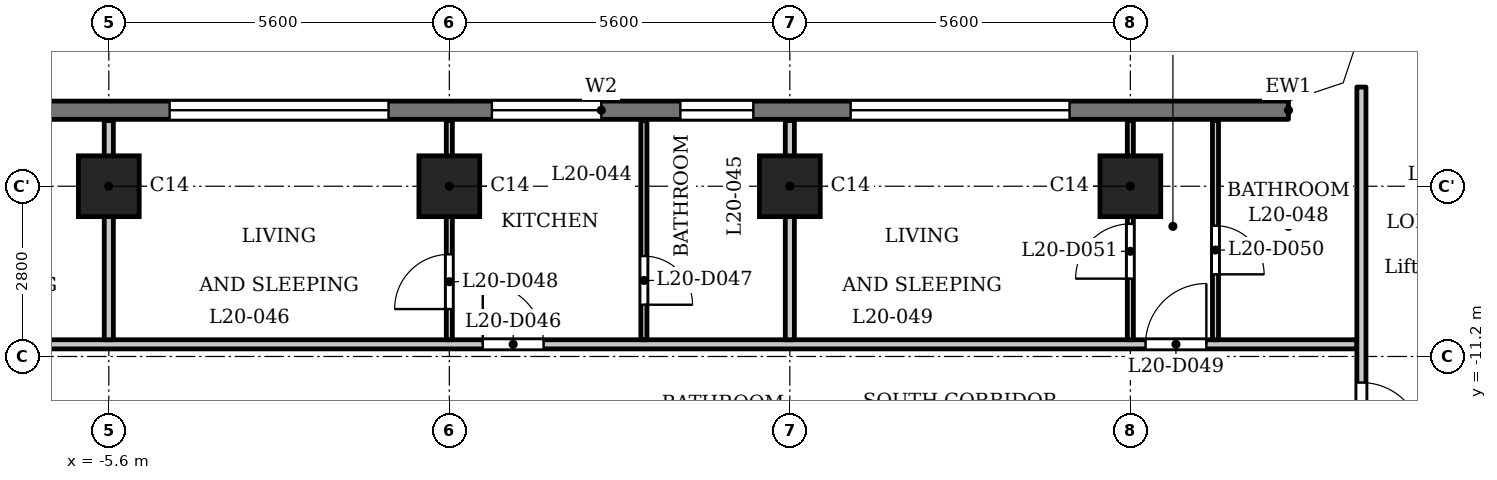
"""IFC4 building model, lengths in metres.
Left out: names, types, materials, properties, quantities, classifications, styles, units other than length and angle.
Written with IfcOpenShell. Run it as: python <this file> out.ifc"""

import sys

from ifc_helpers import new_model, si_unit, direction, frame, frame_2d, origin, origin_2d, place, context, subcontext, project, spatial, polyline, rectangle, outline, extrude, element, fill, save


model = new_model("IFC4")
c1 = context("Model", 3, precision=1e-05, world=origin(), true_north=direction((0.0, 1.0)))
c2 = subcontext(c1, "Body", "Model", "MODEL_VIEW")
j1 = project(units=[si_unit("LENGTHUNIT", "METRE"), si_unit("PLANEANGLEUNIT", "RADIAN")], contexts=[c1])
p1 = place(None, origin())
s1 = spatial("IfcSite", under=j1, at=p1, CompositionType="ELEMENT")
p2 = place(p1, origin())
s2 = spatial("IfcBuilding", under=s1, at=p2, CompositionType="ELEMENT")
p3 = place(p2, frame((0.0, 0.0, 83.3)))
s3 = spatial("IfcBuildingStorey", under=s2, at=p3, CompositionType="ELEMENT", Elevation=83.3)
for number, where, z_axis, x_axis in (
    (1, (-5.6, -8.4, 0.0), (0.0, 0.0, 1.0), (1.0, 0.0, 0.0)),
    (2, (0.0, -8.4, 0.0), (0.0, 0.0, 1.0), (1.0, 0.0, 0.0)),
    (3, (5.6, -8.4, 0.0), (0.0, 0.0, 1.0), (1.0, 0.0, 0.0)),
    (4, (11.2, -8.4, 0.0), (0.0, 0.0, 1.0), (1.0, 0.0, 0.0)),
):
    element("IfcColumn", number, at=place(p3, frame(where, z_axis=z_axis, x_axis=x_axis)), inside=s3, PredefinedType="COLUMN", context=c2, shape_type="SweptSolid", body=[
        extrude(rectangle(XDim=1.0, YDim=1.0, at=origin_2d()), origin(), (0.0, 0.0, 1.0), 3.5),
    ])
p4 = place(p3, frame((13.8, -7.15, 0.0), z_axis=(0.0, 0.0, 1.0), x_axis=(-1.0, 0.0, 0.0)))
e5 = element("IfcWall", 5, at=p4, inside=s3, PredefinedType="SOLIDWALL", context=c2, shape_type="SweptSolid", body=[
    extrude(rectangle(XDim=27.6, YDim=0.3, at=frame_2d((13.8, 0.0))), origin(), (0.0, 0.0, 1.0), 3.2),
])
p5 = place(p4, frame((3.6, 0.0, 1.2)))
e6 = element("IfcOpeningElement", 6, at=p5, cuts=e5, PredefinedType="OPENING", context=c2, shape_type="SweptSolid", body=[
    extrude(rectangle(XDim=3.6, YDim=0.95, at=frame_2d((1.8, 0.475))), frame((0.0, 0.16, 0.0), z_axis=(0.0, -1.0, 0.0), x_axis=(1.0, 0.0, 0.0)), (0.0, 0.0, 1.0), 0.32),
])
p6 = place(p4, frame((8.8, 0.0, 0.6)))
e7 = element("IfcOpeningElement", 7, at=p6, cuts=e5, PredefinedType="OPENING", context=c2, shape_type="SweptSolid", body=[
    extrude(rectangle(XDim=1.2, YDim=1.55, at=frame_2d((0.6, 0.775))), frame((0.0, 0.16, 0.0), z_axis=(0.0, -1.0, 0.0), x_axis=(1.0, 0.0, 0.0)), (0.0, 0.0, 1.0), 0.32),
])
p7 = place(p4, frame((11.3, 0.0, 0.9)))
e8 = element("IfcOpeningElement", 8, at=p7, cuts=e5, PredefinedType="OPENING", context=c2, shape_type="SweptSolid", body=[
    extrude(rectangle(XDim=1.8, YDim=1.25, at=frame_2d((0.9, 0.625))), frame((0.0, 0.16, 0.0), z_axis=(0.0, -1.0, 0.0), x_axis=(1.0, 0.0, 0.0)), (0.0, 0.0, 1.0), 0.32),
])
p8 = place(p4, frame((14.8, 0.0, 1.2)))
e9 = element("IfcOpeningElement", 9, at=p8, cuts=e5, PredefinedType="OPENING", context=c2, shape_type="SweptSolid", body=[
    extrude(rectangle(XDim=3.6, YDim=0.95, at=frame_2d((1.8, 0.475))), frame((0.0, 0.16, 0.0), z_axis=(0.0, -1.0, 0.0), x_axis=(1.0, 0.0, 0.0)), (0.0, 0.0, 1.0), 0.32),
])
p9 = place(p4, frame((20.4, 0.0, 1.2)))
e10 = element("IfcOpeningElement", 10, at=p9, cuts=e5, PredefinedType="OPENING", context=c2, shape_type="SweptSolid", body=[
    extrude(rectangle(XDim=3.6, YDim=0.95, at=frame_2d((1.8, 0.475))), frame((0.0, 0.16, 0.0), z_axis=(0.0, -1.0, 0.0), x_axis=(1.0, 0.0, 0.0)), (0.0, 0.0, 1.0), 0.32),
])
p10 = place(p3, frame((-14.925, -11.0, 0.0), z_axis=(0.0, 0.0, 1.0), x_axis=(1.0, 0.0, 0.0)))
e11 = element("IfcWall", 11, at=p10, inside=s3, PredefinedType="PARTITIONING", context=c2, shape_type="SweptSolid", body=[
    extrude(rectangle(XDim=29.85, YDim=0.15, at=frame_2d((14.925, 0.0))), origin(), (0.0, 0.0, 1.0), 3.2),
])
p11 = place(p10, frame((2.575, 0.0, 0.0)))
e12 = element("IfcOpeningElement", 12, at=p11, cuts=e11, PredefinedType="OPENING", context=c2, shape_type="SweptSolid", body=[
    extrude(rectangle(XDim=1.0, YDim=2.1, at=frame_2d((0.5, 1.05))), frame((0.0, 0.085, 0.0), z_axis=(0.0, -1.0, 0.0), x_axis=(1.0, 0.0, 0.0)), (0.0, 0.0, 1.0), 0.17),
])
p12 = place(p10, frame((15.475, 0.0, 0.0)))
e13 = element("IfcOpeningElement", 13, at=p12, cuts=e11, PredefinedType="OPENING", context=c2, shape_type="SweptSolid", body=[
    extrude(rectangle(XDim=1.0, YDim=2.1, at=frame_2d((0.5, 1.05))), frame((0.0, 0.085, 0.0), z_axis=(0.0, -1.0, 0.0), x_axis=(1.0, 0.0, 0.0)), (0.0, 0.0, 1.0), 0.17),
])
p13 = place(p10, frame((26.375, 0.0, 0.0)))
e14 = element("IfcOpeningElement", 14, at=p13, cuts=e11, PredefinedType="OPENING", context=c2, shape_type="SweptSolid", body=[
    extrude(rectangle(XDim=1.0, YDim=2.1, at=frame_2d((0.5, 1.05))), frame((0.0, 0.085, 0.0), z_axis=(0.0, -1.0, 0.0), x_axis=(1.0, 0.0, 0.0)), (0.0, 0.0, 1.0), 0.17),
])
p14 = place(p3, frame((-5.6, -10.925, 0.0), z_axis=(0.0, 0.0, 1.0), x_axis=(0.0, 1.0, 0.0)))
e15 = element("IfcWall", 15, at=p14, inside=s3, PredefinedType="PARTITIONING", context=c2, shape_type="SweptSolid", body=[
    extrude(rectangle(XDim=3.605, YDim=0.15, at=frame_2d((1.802, 0.0))), origin(), (0.0, 0.0, 1.0), 3.2),
])
p15 = place(p3, frame((0.0, -10.925, 0.0), z_axis=(0.0, 0.0, 1.0), x_axis=(0.0, 1.0, 0.0)))
e16 = element("IfcWall", 16, at=p15, inside=s3, PredefinedType="PARTITIONING", context=c2, shape_type="SweptSolid", body=[
    extrude(rectangle(XDim=3.605, YDim=0.1, at=frame_2d((1.802, 0.0))), origin(), (0.0, 0.0, 1.0), 3.2),
])
p16 = place(p15, frame((0.505, 0.0, 0.0)))
e17 = element("IfcOpeningElement", 17, at=p16, cuts=e16, PredefinedType="OPENING", context=c2, shape_type="SweptSolid", body=[
    extrude(rectangle(XDim=0.9, YDim=2.1, at=frame_2d((0.45, 1.05))), frame((0.0, 0.06, 0.0), z_axis=(0.0, -1.0, 0.0), x_axis=(1.0, 0.0, 0.0)), (0.0, 0.0, 1.0), 0.12),
])
p17 = place(p3, frame((3.2, -10.925, 0.0), z_axis=(0.0, 0.0, 1.0), x_axis=(0.0, 1.0, 0.0)))
e18 = element("IfcWall", 18, at=p17, inside=s3, PredefinedType="PARTITIONING", context=c2, shape_type="SweptSolid", body=[
    extrude(rectangle(XDim=3.605, YDim=0.1, at=frame_2d((1.802, 0.0))), origin(), (0.0, 0.0, 1.0), 3.2),
])
p18 = place(p17, frame((0.576, 0.0, 0.0)))
e19 = element("IfcOpeningElement", 19, at=p18, cuts=e18, PredefinedType="OPENING", context=c2, shape_type="SweptSolid", body=[
    extrude(rectangle(XDim=0.8, YDim=2.1, at=frame_2d((0.4, 1.05))), frame((0.0, 0.06, 0.0), z_axis=(0.0, -1.0, 0.0), x_axis=(1.0, 0.0, 0.0)), (0.0, 0.0, 1.0), 0.12),
])
p19 = place(p3, frame((5.6, -10.925, 0.0), z_axis=(0.0, 0.0, 1.0), x_axis=(0.0, 1.0, 0.0)))
e20 = element("IfcWall", 20, at=p19, inside=s3, PredefinedType="PARTITIONING", context=c2, shape_type="SweptSolid", body=[
    extrude(rectangle(XDim=3.605, YDim=0.15, at=frame_2d((1.802, 0.0))), origin(), (0.0, 0.0, 1.0), 3.2),
])
p20 = place(p3, frame((11.2, -10.925, 0.0), z_axis=(0.0, 0.0, 1.0), x_axis=(0.0, 1.0, 0.0)))
e21 = element("IfcWall", 21, at=p20, inside=s3, PredefinedType="PARTITIONING", context=c2, shape_type="SweptSolid", body=[
    extrude(rectangle(XDim=3.605, YDim=0.1, at=frame_2d((1.802, 0.0))), origin(), (0.0, 0.0, 1.0), 3.2),
])
p21 = place(p20, frame((1.005, 0.0, 0.0)))
e22 = element("IfcOpeningElement", 22, at=p21, cuts=e21, PredefinedType="OPENING", context=c2, shape_type="SweptSolid", body=[
    extrude(rectangle(XDim=0.9, YDim=2.1, at=frame_2d((0.45, 1.05))), frame((0.0, 0.06, 0.0), z_axis=(0.0, -1.0, 0.0), x_axis=(1.0, 0.0, 0.0)), (0.0, 0.0, 1.0), 0.12),
])
p22 = place(p3, frame((12.6, -10.925, 0.0), z_axis=(0.0, 0.0, 1.0), x_axis=(0.0, 1.0, 0.0)))
e23 = element("IfcWall", 23, at=p22, inside=s3, PredefinedType="PARTITIONING", context=c2, shape_type="SweptSolid", body=[
    extrude(rectangle(XDim=3.605, YDim=0.1, at=frame_2d((1.802, 0.0))), origin(), (0.0, 0.0, 1.0), 3.2),
])
p23 = place(p22, frame((1.076, 0.0, 0.0)))
e24 = element("IfcOpeningElement", 24, at=p23, cuts=e23, PredefinedType="OPENING", context=c2, shape_type="SweptSolid", body=[
    extrude(rectangle(XDim=0.8, YDim=2.1, at=frame_2d((0.4, 1.05))), frame((0.0, 0.06, 0.0), z_axis=(0.0, -1.0, 0.0), x_axis=(1.0, 0.0, 0.0)), (0.0, 0.0, 1.0), 0.12),
])
p24 = place(p3, frame((15.0, -13.125, 0.0), z_axis=(0.0, 0.0, 1.0), x_axis=(0.0, 1.0, 0.0)))
e25 = element("IfcWall", 25, at=p24, inside=s3, PredefinedType="PARTITIONING", context=c2, shape_type="SweptSolid", body=[
    extrude(rectangle(XDim=6.356, YDim=0.15, at=frame_2d((3.178, 0.0))), origin(), (0.0, 0.0, 1.0), 3.2),
])
p25 = place(p24, frame((0.496, 0.0, 0.0)))
e26 = element("IfcOpeningElement", 26, at=p25, cuts=e25, PredefinedType="OPENING", context=c2, shape_type="SweptSolid", body=[
    extrude(rectangle(XDim=1.0, YDim=2.1, at=frame_2d((0.5, 1.05))), frame((0.0, 0.085, 0.0), z_axis=(0.0, -1.0, 0.0), x_axis=(1.0, 0.0, 0.0)), (0.0, 0.0, 1.0), 0.17),
])
p26 = place(p3, origin())
e27 = element("IfcWall", 27, at=p26, inside=s3, PredefinedType="SOLIDWALL", context=c2, shape_type="SweptSolid", body=[
    extrude(outline(polyline([(14.937, -6.937), (15.3, -5.849), (15.3, -5.8), (15.0, -5.8), (14.7, -6.7), (13.8, -7.0), (13.8, -7.3), (13.849, -7.3), (14.937, -6.937)])), origin(), (0.0, 0.0, 1.0), 3.2),
])
p27 = place(p25, origin())
e28 = element("IfcDoor", 28, at=p27, inside=s3, OperationType="SINGLE_SWING_LEFT", PredefinedType="DOOR", context=c2, shape_type="SweptSolid", body=[
    extrude(rectangle(XDim=1.0, YDim=2.1, at=frame_2d((0.5, 1.05))), frame((0.0, 0.025, 0.0), z_axis=(0.0, -1.0, 0.0), x_axis=(1.0, 0.0, 0.0)), (0.0, 0.0, 1.0), 0.05),
])
fill(e26, e28)
p28 = place(p12, origin())
e29 = element("IfcDoor", 29, at=p28, inside=s3, OperationType="SINGLE_SWING_RIGHT", PredefinedType="DOOR", context=c2, shape_type="SweptSolid", body=[
    extrude(rectangle(XDim=1.0, YDim=2.1, at=frame_2d((0.5, 1.05))), frame((0.0, 0.025, 0.0), z_axis=(0.0, -1.0, 0.0), x_axis=(1.0, 0.0, 0.0)), (0.0, 0.0, 1.0), 0.05),
])
fill(e13, e29)
p29 = place(p18, origin())
e30 = element("IfcDoor", 30, at=p29, inside=s3, OperationType="SINGLE_SWING_LEFT", PredefinedType="DOOR", context=c2, shape_type="SweptSolid", body=[
    extrude(rectangle(XDim=0.8, YDim=2.1, at=frame_2d((0.4, 1.05))), frame((0.0, 0.025, 0.0), z_axis=(0.0, -1.0, 0.0), x_axis=(1.0, 0.0, 0.0)), (0.0, 0.0, 1.0), 0.05),
])
fill(e19, e30)
p30 = place(p16, origin())
e31 = element("IfcDoor", 31, at=p30, inside=s3, OperationType="SINGLE_SWING_RIGHT", PredefinedType="DOOR", context=c2, shape_type="SweptSolid", body=[
    extrude(rectangle(XDim=0.9, YDim=2.1, at=frame_2d((0.45, 1.05))), frame((0.0, 0.025, 0.0), z_axis=(0.0, -1.0, 0.0), x_axis=(1.0, 0.0, 0.0)), (0.0, 0.0, 1.0), 0.05),
])
fill(e17, e31)
p31 = place(p13, origin())
e32 = element("IfcDoor", 32, at=p31, inside=s3, OperationType="SINGLE_SWING_LEFT", PredefinedType="DOOR", context=c2, shape_type="SweptSolid", body=[
    extrude(rectangle(XDim=1.0, YDim=2.1, at=frame_2d((0.5, 1.05))), frame((0.0, 0.025, 0.0), z_axis=(0.0, -1.0, 0.0), x_axis=(1.0, 0.0, 0.0)), (0.0, 0.0, 1.0), 0.05),
])
fill(e14, e32)
p32 = place(p23, origin())
e33 = element("IfcDoor", 33, at=p32, inside=s3, OperationType="SINGLE_SWING_LEFT", PredefinedType="DOOR", context=c2, shape_type="SweptSolid", body=[
    extrude(rectangle(XDim=0.8, YDim=2.1, at=frame_2d((0.4, 1.05))), frame((0.0, 0.025, 0.0), z_axis=(0.0, -1.0, 0.0), x_axis=(1.0, 0.0, 0.0)), (0.0, 0.0, 1.0), 0.05),
])
fill(e24, e33)
p33 = place(p21, origin())
e34 = element("IfcDoor", 34, at=p33, inside=s3, OperationType="SINGLE_SWING_RIGHT", PredefinedType="DOOR", context=c2, shape_type="SweptSolid", body=[
    extrude(rectangle(XDim=0.9, YDim=2.1, at=frame_2d((0.45, 1.05))), frame((0.0, 0.025, 0.0), z_axis=(0.0, -1.0, 0.0), x_axis=(1.0, 0.0, 0.0)), (0.0, 0.0, 1.0), 0.05),
])
fill(e22, e34)
p34 = place(p5, origin())
e35 = element("IfcWindow", 35, at=p34, inside=s3, PartitioningType="SINGLE_PANEL", PredefinedType="WINDOW", context=c2, shape_type="SweptSolid", body=[
    extrude(rectangle(XDim=3.6, YDim=0.95, at=frame_2d((1.8, 0.475))), frame((0.0, 0.03, 0.0), z_axis=(0.0, -1.0, 0.0), x_axis=(1.0, 0.0, 0.0)), (0.0, 0.0, 1.0), 0.06),
])
fill(e6, e35)
p35 = place(p6, origin())
e36 = element("IfcWindow", 36, at=p35, inside=s3, PartitioningType="SINGLE_PANEL", PredefinedType="WINDOW", context=c2, shape_type="SweptSolid", body=[
    extrude(rectangle(XDim=1.2, YDim=1.55, at=frame_2d((0.6, 0.775))), frame((0.0, 0.03, 0.0), z_axis=(0.0, -1.0, 0.0), x_axis=(1.0, 0.0, 0.0)), (0.0, 0.0, 1.0), 0.06),
])
fill(e7, e36)
p36 = place(p7, origin())
e37 = element("IfcWindow", 37, at=p36, inside=s3, PartitioningType="SINGLE_PANEL", PredefinedType="WINDOW", context=c2, shape_type="SweptSolid", body=[
    extrude(rectangle(XDim=1.8, YDim=1.25, at=frame_2d((0.9, 0.625))), frame((0.0, 0.03, 0.0), z_axis=(0.0, -1.0, 0.0), x_axis=(1.0, 0.0, 0.0)), (0.0, 0.0, 1.0), 0.06),
])
fill(e8, e37)
p37 = place(p8, origin())
e38 = element("IfcWindow", 38, at=p37, inside=s3, PartitioningType="SINGLE_PANEL", PredefinedType="WINDOW", context=c2, shape_type="SweptSolid", body=[
    extrude(rectangle(XDim=3.6, YDim=0.95, at=frame_2d((1.8, 0.475))), frame((0.0, 0.03, 0.0), z_axis=(0.0, -1.0, 0.0), x_axis=(1.0, 0.0, 0.0)), (0.0, 0.0, 1.0), 0.06),
])
fill(e9, e38)
save(model, sys.argv[1])
